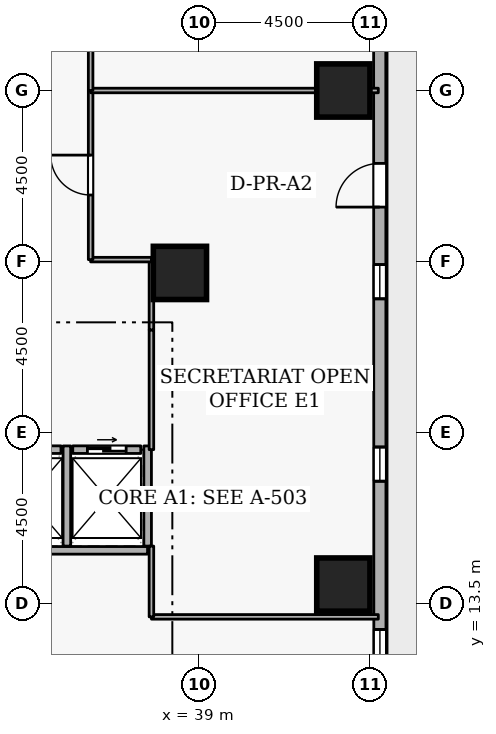
"""IFC4 building model, lengths in metres.
Left out: names, types, materials, properties, quantities, classifications, styles, units other than length and angle.
Written with IfcOpenShell. Run it as: python <this file> out.ifc"""

import sys

from ifc_helpers import new_model, si_unit, direction, frame, frame_2d, origin, origin_2d, place, context, subcontext, project, spatial, rectangle, extrude, element, fill, save


model = new_model("IFC4")
c1 = context("Model", 3, precision=1e-05, world=origin(), true_north=direction((0.0, 1.0)))
c2 = subcontext(c1, "Body", "Model", "MODEL_VIEW")
j1 = project(units=[si_unit("LENGTHUNIT", "METRE"), si_unit("PLANEANGLEUNIT", "RADIAN")], contexts=[c1])
p1 = place(None, origin())
s1 = spatial("IfcSite", under=j1, at=p1, CompositionType="ELEMENT")
p2 = place(p1, origin())
s2 = spatial("IfcBuilding", under=s1, at=p2, CompositionType="ELEMENT")
p3 = place(p2, frame((0.0, 0.0, 27.9)))
s3 = spatial("IfcBuildingStorey", under=s2, at=p3, CompositionType="ELEMENT", Elevation=27.9)
for number, where, z_axis, x_axis in (
    (1, (42.8, 14.0, 0.0), (0.0, 0.0, 1.0), (1.0, 0.0, 0.0)),
    (2, (42.8, 27.0, 0.0), (0.0, 0.0, 1.0), (1.0, 0.0, 0.0)),
    (3, (38.5, 22.2, 0.0), (0.0, 0.0, 1.0), (1.0, 0.0, 0.0)),
):
    element("IfcColumn", number, at=place(p3, frame(where, z_axis=z_axis, x_axis=x_axis)), inside=s3, PredefinedType="COLUMN", context=c2, shape_type="SweptSolid", body=[
        extrude(rectangle(XDim=1.4, YDim=1.4, at=origin_2d()), origin(), (0.0, 0.0, 1.0), 3.6),
    ])
p4 = place(p3, frame((43.765, 5.319, 0.0), z_axis=(0.0, 0.0, 1.0), x_axis=(-0.000339718087, 0.999999942296, 0.0)))
e4 = element("IfcWall", 4, at=p4, inside=s3, PredefinedType="STANDARD", context=c2, shape_type="SweptSolid", body=[
    extrude(rectangle(XDim=33.777, YDim=0.32, at=frame_2d((16.888, 0.0))), origin(), (0.0, 0.0, 1.0), 2.7),
])
p5 = place(p4, frame((18.614, 0.0, 0.0)))
e5 = element("IfcOpeningElement", 5, at=p5, cuts=e4, PredefinedType="OPENING", context=c2, shape_type="SweptSolid", body=[
    extrude(rectangle(XDim=1.15, YDim=2.1, at=frame_2d((0.575, 1.05))), frame((0.0, 0.17, 0.0), z_axis=(0.0, -1.0, 0.0), x_axis=(1.0, 0.0, 0.0)), (0.0, 0.0, 1.0), 0.34),
])
p6 = place(p4, frame((1.8, 0.0, 0.72)))
e6 = element("IfcOpeningElement", 6, at=p6, cuts=e4, PredefinedType="OPENING", context=c2, shape_type="SweptSolid", body=[
    extrude(rectangle(XDim=0.9, YDim=1.75, at=frame_2d((0.45, 0.875))), frame((0.0, 0.17, 0.0), z_axis=(0.0, -1.0, 0.0), x_axis=(1.0, 0.0, 0.0)), (0.0, 0.0, 1.0), 0.34),
])
p7 = place(p4, frame((6.6, 0.0, 0.72)))
e7 = element("IfcOpeningElement", 7, at=p7, cuts=e4, PredefinedType="OPENING", context=c2, shape_type="SweptSolid", body=[
    extrude(rectangle(XDim=0.9, YDim=1.75, at=frame_2d((0.45, 0.875))), frame((0.0, 0.17, 0.0), z_axis=(0.0, -1.0, 0.0), x_axis=(1.0, 0.0, 0.0)), (0.0, 0.0, 1.0), 0.34),
])
p8 = place(p4, frame((11.4, 0.0, 0.72)))
e8 = element("IfcOpeningElement", 8, at=p8, cuts=e4, PredefinedType="OPENING", context=c2, shape_type="SweptSolid", body=[
    extrude(rectangle(XDim=0.9, YDim=1.75, at=frame_2d((0.45, 0.875))), frame((0.0, 0.17, 0.0), z_axis=(0.0, -1.0, 0.0), x_axis=(1.0, 0.0, 0.0)), (0.0, 0.0, 1.0), 0.34),
])
p9 = place(p4, frame((16.2, 0.0, 0.72)))
e9 = element("IfcOpeningElement", 9, at=p9, cuts=e4, PredefinedType="OPENING", context=c2, shape_type="SweptSolid", body=[
    extrude(rectangle(XDim=0.9, YDim=1.75, at=frame_2d((0.45, 0.875))), frame((0.0, 0.17, 0.0), z_axis=(0.0, -1.0, 0.0), x_axis=(1.0, 0.0, 0.0)), (0.0, 0.0, 1.0), 0.34),
])
p10 = place(p4, frame((25.8, 0.0, 0.72)))
e10 = element("IfcOpeningElement", 10, at=p10, cuts=e4, PredefinedType="OPENING", context=c2, shape_type="SweptSolid", body=[
    extrude(rectangle(XDim=0.9, YDim=1.75, at=frame_2d((0.45, 0.875))), frame((0.0, 0.17, 0.0), z_axis=(0.0, -1.0, 0.0), x_axis=(1.0, 0.0, 0.0)), (0.0, 0.0, 1.0), 0.34),
])
p11 = place(p4, frame((30.6, 0.0, 0.72)))
e11 = element("IfcOpeningElement", 11, at=p11, cuts=e4, PredefinedType="OPENING", context=c2, shape_type="SweptSolid", body=[
    extrude(rectangle(XDim=0.9, YDim=1.75, at=frame_2d((0.45, 0.875))), frame((0.0, 0.17, 0.0), z_axis=(0.0, -1.0, 0.0), x_axis=(1.0, 0.0, 0.0)), (0.0, 0.0, 1.0), 0.34),
])
p12 = place(p3, frame((33.63, 17.55, 0.0), z_axis=(0.0, 0.0, 1.0), x_axis=(1.0, 0.0, 0.0)))
e12 = element("IfcWall", 12, at=p12, inside=s3, PredefinedType="STANDARD", context=c2, shape_type="SweptSolid", body=[
    extrude(rectangle(XDim=1.74, YDim=0.2, at=frame_2d((0.87, 0.0))), origin(), (0.0, 0.0, 1.0), 3.34),
])
p13 = place(p12, frame((0.36, 0.0, 0.0)))
e13 = element("IfcOpeningElement", 13, at=p13, cuts=e12, PredefinedType="OPENING", context=c2, shape_type="SweptSolid", body=[
    extrude(rectangle(XDim=1.02, YDim=2.06, at=frame_2d((0.51, 1.03))), frame((0.0, 0.11, 0.0), z_axis=(0.0, -1.0, 0.0), x_axis=(1.0, 0.0, 0.0)), (0.0, 0.0, 1.0), 0.22),
])
p14 = place(p3, frame((35.68, 17.55, 0.0), z_axis=(0.0, 0.0, 1.0), x_axis=(1.0, 0.0, 0.0)))
e14 = element("IfcWall", 14, at=p14, inside=s3, PredefinedType="STANDARD", context=c2, shape_type="SweptSolid", body=[
    extrude(rectangle(XDim=1.79, YDim=0.2, at=frame_2d((0.895, 0.0))), origin(), (0.0, 0.0, 1.0), 3.34),
])
p15 = place(p14, frame((0.385, 0.0, 0.0)))
e15 = element("IfcOpeningElement", 15, at=p15, cuts=e14, PredefinedType="OPENING", context=c2, shape_type="SweptSolid", body=[
    extrude(rectangle(XDim=1.02, YDim=2.06, at=frame_2d((0.51, 1.03))), frame((0.0, 0.11, 0.0), z_axis=(0.0, -1.0, 0.0), x_axis=(1.0, 0.0, 0.0)), (0.0, 0.0, 1.0), 0.22),
])
p16 = place(p3, frame((33.452, 14.9, 0.0), z_axis=(0.0, 0.0, 1.0), x_axis=(1.0, 0.0, 0.0)))
e16 = element("IfcWall", 16, at=p16, inside=s3, PredefinedType="STANDARD", context=c2, shape_type="SweptSolid", body=[
    extrude(rectangle(XDim=4.196, YDim=0.2, at=frame_2d((2.098, 0.0))), origin(), (0.0, 0.0, 1.0), 3.34),
])
for number, where, z_axis, x_axis in (
    (17, (35.525, 15.012, 0.0), (0.0, 0.0, 1.0), (0.0, 1.0, 0.0)),
    (18, (37.65, 15.012, 0.0), (0.0, 0.0, 1.0), (0.0, 1.0, 0.0)),
):
    element("IfcWall", number, at=place(p3, frame(where, z_axis=z_axis, x_axis=x_axis)), inside=s3, PredefinedType="STANDARD", context=c2, shape_type="SweptSolid", body=[
        extrude(rectangle(XDim=2.636, YDim=0.2, at=frame_2d((1.318, 0.0))), origin(), (0.0, 0.0, 1.0), 3.34),
    ])
p17 = place(p3, frame((37.75, 17.55, 0.0), z_axis=(0.0, 0.0, 1.0), x_axis=(0.0, 1.0, 0.0)))
e19 = element("IfcWall", 19, at=p17, inside=s3, PredefinedType="PARTITIONING", context=c2, shape_type="SweptSolid", body=[
    extrude(rectangle(XDim=3.15, YDim=0.12, at=frame_2d((1.575, 0.0))), origin(), (0.0, 0.0, 1.0), 3.34),
])
p18 = place(p3, frame((37.75, 20.7, 0.0), z_axis=(0.0, 0.0, 1.0), x_axis=(0.0, 1.0, 0.0)))
e20 = element("IfcWall", 20, at=p18, inside=s3, PredefinedType="PARTITIONING", context=c2, shape_type="SweptSolid", body=[
    extrude(rectangle(XDim=1.85, YDim=0.12, at=frame_2d((0.925, 0.0))), origin(), (0.0, 0.0, 1.0), 3.34),
])
p19 = place(p3, frame((37.75, 22.55, 0.0), z_axis=(0.0, 0.0, 1.0), x_axis=(-1.0, 0.0, 0.0)))
e21 = element("IfcWall", 21, at=p19, inside=s3, PredefinedType="PARTITIONING", context=c2, shape_type="SweptSolid", body=[
    extrude(rectangle(XDim=1.6, YDim=0.12, at=frame_2d((0.8, 0.0))), origin(), (0.0, 0.0, 1.0), 3.34),
])
p20 = place(p3, frame((36.15, 22.55, 0.0), z_axis=(0.0, 0.0, 1.0), x_axis=(0.0, 1.0, 0.0)))
e22 = element("IfcWall", 22, at=p20, inside=s3, PredefinedType="PARTITIONING", context=c2, shape_type="SweptSolid", body=[
    extrude(rectangle(XDim=4.45, YDim=0.12, at=frame_2d((2.225, 0.0))), origin(), (0.0, 0.0, 1.0), 3.34),
])
p21 = place(p20, frame((1.7, 0.0, 0.0)))
e23 = element("IfcOpeningElement", 23, at=p21, cuts=e22, PredefinedType="OPENING", context=c2, shape_type="SweptSolid", body=[
    extrude(rectangle(XDim=1.05, YDim=2.1, at=frame_2d((0.525, 1.05))), frame((0.0, 0.07, 0.0), z_axis=(0.0, -1.0, 0.0), x_axis=(1.0, 0.0, 0.0)), (0.0, 0.0, 1.0), 0.14),
])
p22 = place(p3, frame((36.15, 27.0, 0.0), z_axis=(0.0, 0.0, 1.0), x_axis=(1.0, 0.0, 0.0)))
e24 = element("IfcWall", 24, at=p22, inside=s3, PredefinedType="PARTITIONING", context=c2, shape_type="SweptSolid", body=[
    extrude(rectangle(XDim=7.57, YDim=0.12, at=frame_2d((3.785, 0.0))), origin(), (0.0, 0.0, 1.0), 2.878),
])
p23 = place(p3, frame((43.72, 13.15, 0.0), z_axis=(0.0, 0.0, 1.0), x_axis=(-1.0, 0.0, 0.0)))
e25 = element("IfcWall", 25, at=p23, inside=s3, PredefinedType="PARTITIONING", context=c2, shape_type="SweptSolid", body=[
    extrude(rectangle(XDim=5.97, YDim=0.12, at=frame_2d((2.985, 0.0))), origin(), (0.0, 0.0, 1.0), 3.34),
])
p24 = place(p3, frame((37.75, 13.15, 0.0), z_axis=(0.0, 0.0, 1.0), x_axis=(0.0, 1.0, 0.0)))
e26 = element("IfcWall", 26, at=p24, inside=s3, PredefinedType="PARTITIONING", context=c2, shape_type="SweptSolid", body=[
    extrude(rectangle(XDim=1.862, YDim=0.12, at=frame_2d((0.931, 0.0))), origin(), (0.0, 0.0, 1.0), 3.34),
])
p25 = place(p3, frame((36.15, 27.0, 0.0), z_axis=(0.0, 0.0, 1.0), x_axis=(0.0, 1.0, 0.0)))
e27 = element("IfcWall", 27, at=p25, inside=s3, PredefinedType="PARTITIONING", context=c2, shape_type="SweptSolid", body=[
    extrude(rectangle(XDim=4.45, YDim=0.12, at=frame_2d((2.225, 0.0))), origin(), (0.0, 0.0, 1.0), 3.34),
])
p26 = place(p25, frame((1.7, 0.0, 0.0)))
e28 = element("IfcOpeningElement", 28, at=p26, cuts=e27, PredefinedType="OPENING", context=c2, shape_type="SweptSolid", body=[
    extrude(rectangle(XDim=1.05, YDim=2.1, at=frame_2d((0.525, 1.05))), frame((0.0, 0.07, 0.0), z_axis=(0.0, -1.0, 0.0), x_axis=(1.0, 0.0, 0.0)), (0.0, 0.0, 1.0), 0.14),
])
p27 = place(p5, origin())
e29 = element("IfcDoor", 29, at=p27, inside=s3, OperationType="SINGLE_SWING_LEFT", PredefinedType="DOOR", context=c2, shape_type="SweptSolid", body=[
    extrude(rectangle(XDim=1.15, YDim=2.1, at=frame_2d((0.575, 1.05))), frame((0.0, 0.025, 0.0), z_axis=(0.0, -1.0, 0.0), x_axis=(1.0, 0.0, 0.0)), (0.0, 0.0, 1.0), 0.05),
])
fill(e5, e29)
p28 = place(p7, origin())
e30 = element("IfcWindow", 30, at=p28, inside=s3, PartitioningType="SINGLE_PANEL", PredefinedType="WINDOW", context=c2, shape_type="SweptSolid", body=[
    extrude(rectangle(XDim=0.9, YDim=1.75, at=frame_2d((0.45, 0.875))), frame((0.0, 0.03, 0.0), z_axis=(0.0, -1.0, 0.0), x_axis=(1.0, 0.0, 0.0)), (0.0, 0.0, 1.0), 0.06),
])
fill(e7, e30)
p29 = place(p8, origin())
e31 = element("IfcWindow", 31, at=p29, inside=s3, PartitioningType="SINGLE_PANEL", PredefinedType="WINDOW", context=c2, shape_type="SweptSolid", body=[
    extrude(rectangle(XDim=0.9, YDim=1.75, at=frame_2d((0.45, 0.875))), frame((0.0, 0.03, 0.0), z_axis=(0.0, -1.0, 0.0), x_axis=(1.0, 0.0, 0.0)), (0.0, 0.0, 1.0), 0.06),
])
fill(e8, e31)
p30 = place(p9, origin())
e32 = element("IfcWindow", 32, at=p30, inside=s3, PartitioningType="SINGLE_PANEL", PredefinedType="WINDOW", context=c2, shape_type="SweptSolid", body=[
    extrude(rectangle(XDim=0.9, YDim=1.75, at=frame_2d((0.45, 0.875))), frame((0.0, 0.03, 0.0), z_axis=(0.0, -1.0, 0.0), x_axis=(1.0, 0.0, 0.0)), (0.0, 0.0, 1.0), 0.06),
])
fill(e9, e32)
p31 = place(p15, origin())
e33 = element("IfcDoor", 33, at=p31, inside=s3, OperationType="SLIDING_TO_LEFT", PredefinedType="DOOR", context=c2, shape_type="SweptSolid", body=[
    extrude(rectangle(XDim=1.02, YDim=2.06, at=frame_2d((0.51, 1.03))), frame((0.0, 0.025, 0.0), z_axis=(0.0, -1.0, 0.0), x_axis=(1.0, 0.0, 0.0)), (0.0, 0.0, 1.0), 0.05),
])
fill(e15, e33)
p32 = place(p21, origin())
e34 = element("IfcDoor", 34, at=p32, inside=s3, OperationType="SINGLE_SWING_RIGHT", PredefinedType="DOOR", context=c2, shape_type="SweptSolid", body=[
    extrude(rectangle(XDim=1.05, YDim=2.1, at=frame_2d((0.525, 1.05))), frame((0.0, 0.025, 0.0), z_axis=(0.0, -1.0, 0.0), x_axis=(1.0, 0.0, 0.0)), (0.0, 0.0, 1.0), 0.05),
])
fill(e23, e34)
save(model, sys.argv[1])
